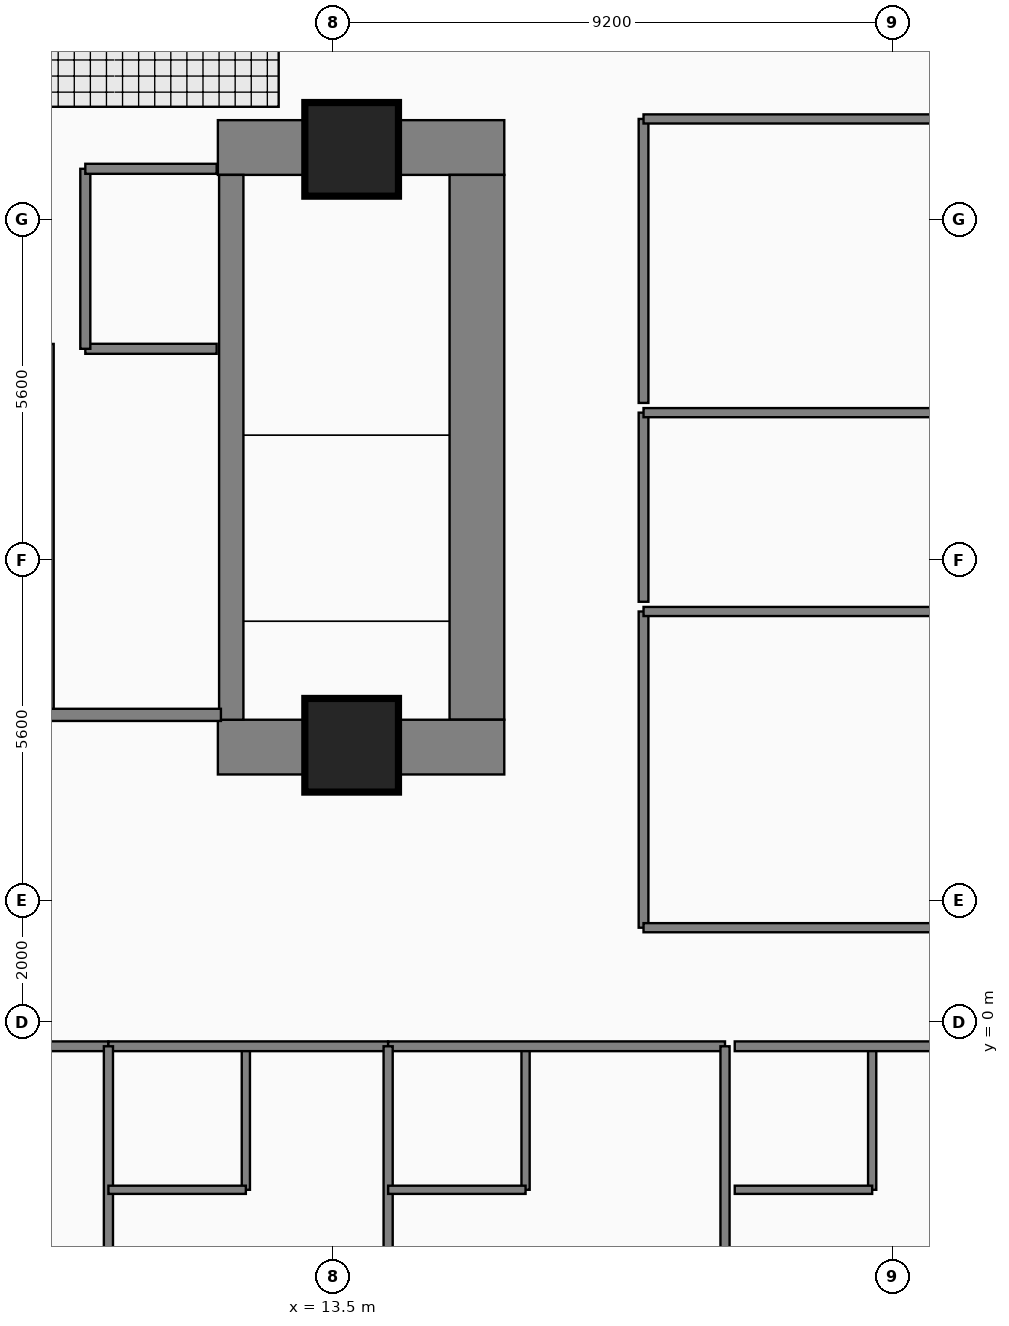
"""IFC4 building model, lengths in metres.
Left out: names, types, materials, properties, quantities, classifications, styles, units other than length and angle.
Written with IfcOpenShell. Run it as: python <this file> out.ifc"""

import sys

from ifc_helpers import new_model, si_unit, direction, frame, frame_2d, origin, origin_2d, place, context, subcontext, project, spatial, rectangle, extrude, element, fill, save


model = new_model("IFC4")
c1 = context("Model", 3, precision=1e-05, world=origin(), true_north=direction((0.0, 1.0)))
c2 = subcontext(c1, "Body", "Model", "MODEL_VIEW")
j1 = project(units=[si_unit("LENGTHUNIT", "METRE"), si_unit("PLANEANGLEUNIT", "RADIAN")], contexts=[c1])
p1 = place(None, origin())
s1 = spatial("IfcSite", under=j1, at=p1, CompositionType="ELEMENT")
p2 = place(p1, origin())
s2 = spatial("IfcBuilding", under=s1, at=p2, CompositionType="ELEMENT")
p3 = place(p2, frame((0.0, 0.0, 27.6)))
s3 = spatial("IfcBuildingStorey", under=s2, at=p3, CompositionType="ELEMENT", Elevation=27.6)
p4 = place(p3, frame((11.6, 14.38, 0.0), z_axis=(0.0, 0.0, 1.0), x_axis=(1.0, 0.0, 0.0)))
e1 = element("IfcWall", 1, at=p4, inside=s3, PredefinedType="SHEAR", context=c2, shape_type="SweptSolid", body=[
    extrude(rectangle(XDim=4.71, YDim=0.9, at=frame_2d((2.355, 0.0))), origin(), (0.0, 0.0, 1.0), 3.46),
])
p5 = place(p3, frame((15.86, 4.97, 0.0), z_axis=(0.0, 0.0, 1.0), x_axis=(0.0, 1.0, 0.0)))
e2 = element("IfcWall", 2, at=p5, inside=s3, PredefinedType="SHEAR", context=c2, shape_type="SweptSolid", body=[
    extrude(rectangle(XDim=8.96, YDim=0.9, at=frame_2d((4.48, 0.0))), origin(), (0.0, 0.0, 1.0), 3.46),
])
p6 = place(p3, frame((11.6, 4.52, 0.0), z_axis=(0.0, 0.0, 1.0), x_axis=(1.0, 0.0, 0.0)))
e3 = element("IfcWall", 3, at=p6, inside=s3, PredefinedType="SHEAR", context=c2, shape_type="SweptSolid", body=[
    extrude(rectangle(XDim=4.71, YDim=0.9, at=frame_2d((2.355, 0.0))), origin(), (0.0, 0.0, 1.0), 3.46),
])
p7 = place(p3, frame((11.82, 13.93, 0.0), z_axis=(0.0, 0.0, 1.0), x_axis=(0.0, -1.0, 0.0)))
e4 = element("IfcWall", 4, at=p7, inside=s3, PredefinedType="SHEAR", context=c2, shape_type="SweptSolid", body=[
    extrude(rectangle(XDim=8.96, YDim=0.4, at=frame_2d((4.48, 0.0))), origin(), (0.0, 0.0, 1.0), 3.46),
])
p8 = place(p7, frame((7.53, 0.0, 0.0)))
e5 = element("IfcOpeningElement", 5, at=p8, cuts=e4, PredefinedType="OPENING", context=c2, shape_type="SweptSolid", body=[
    extrude(rectangle(XDim=1.12, YDim=2.22, at=frame_2d((0.56, 1.11))), frame((0.0, 0.21, 0.0), z_axis=(0.0, -1.0, 0.0), x_axis=(1.0, 0.0, 0.0)), (0.0, 0.0, 1.0), 0.42),
])
for number, where, z_axis, x_axis in (
    (6, (13.8, 14.35, 0.0), (0.0, 0.0, 1.0), (1.0, 0.0, 0.0)),
    (7, (13.8, 4.55, 0.0), (0.0, 0.0, 1.0), (1.0, 0.0, 0.0)),
):
    element("IfcColumn", number, at=place(p3, frame(where, z_axis=z_axis, x_axis=x_axis)), inside=s3, PredefinedType="COLUMN", context=c2, shape_type="SweptSolid", body=[
        extrude(rectangle(XDim=1.5, YDim=1.5, at=origin_2d()), origin(), (0.0, 0.0, 1.0), 3.65),
    ])
p9 = place(p3, frame((8.8, 11.15, 0.0), z_axis=(0.0, 0.0, 1.0), x_axis=(0.0, -1.0, 0.0)))
e8 = element("IfcWall", 8, at=p9, inside=s3, PredefinedType="PARTITIONING", context=c2, shape_type="SweptSolid", body=[
    extrude(rectangle(XDim=6.1, YDim=0.2, at=frame_2d((3.05, 0.0))), origin(), (0.0, 0.0, 1.0), 3.43),
])
p10 = place(p9, frame((1.15, 0.0, 0.0)))
e9 = element("IfcOpeningElement", 9, at=p10, cuts=e8, PredefinedType="OPENING", context=c2, shape_type="SweptSolid", body=[
    extrude(rectangle(XDim=1.1, YDim=2.2, at=frame_2d((0.55, 1.1))), frame((0.0, 0.11, 0.0), z_axis=(0.0, -1.0, 0.0), x_axis=(1.0, 0.0, 0.0)), (0.0, 0.0, 1.0), 0.22),
])
p11 = place(p9, frame((4.75, 0.0, 0.0)))
e10 = element("IfcOpeningElement", 10, at=p11, cuts=e8, PredefinedType="OPENING", context=c2, shape_type="SweptSolid", body=[
    extrude(rectangle(XDim=1.1, YDim=2.2, at=frame_2d((0.55, 1.1))), frame((0.0, 0.11, 0.0), z_axis=(0.0, -1.0, 0.0), x_axis=(1.0, 0.0, 0.0)), (0.0, 0.0, 1.0), 0.22),
])
p12 = place(p3, frame((9.42, 11.07, 0.0), z_axis=(0.0, 0.0, 1.0), x_axis=(1.0, 0.0, 0.0)))
e11 = element("IfcWall", 11, at=p12, inside=s3, PredefinedType="PARTITIONING", context=c2, shape_type="SweptSolid", body=[
    extrude(rectangle(XDim=2.16, YDim=0.165, at=frame_2d((1.08, 0.0))), origin(), (0.0, 0.0, 1.0), 3.43),
])
p13 = place(p12, frame((0.53, 0.0, 0.0)))
e12 = element("IfcOpeningElement", 12, at=p13, cuts=e11, PredefinedType="OPENING", context=c2, shape_type="SweptSolid", body=[
    extrude(rectangle(XDim=1.15, YDim=2.25, at=frame_2d((0.575, 1.125))), frame((0.0, 0.093, 0.0), z_axis=(0.0, -1.0, 0.0), x_axis=(1.0, 0.0, 0.0)), (0.0, 0.0, 1.0), 0.185),
])
p14 = place(p3, frame((4.0, -0.4, 0.0), z_axis=(0.0, 0.0, 1.0), x_axis=(1.0, 0.0, 0.0)))
e13 = element("IfcWall", 13, at=p14, inside=s3, PredefinedType="PARTITIONING", context=c2, shape_type="SweptSolid", body=[
    extrude(rectangle(XDim=5.8, YDim=0.16, at=frame_2d((2.9, 0.0))), origin(), (0.0, 0.0, 1.0), 3.43),
])
p15 = place(p14, frame((3.55, 0.0, 0.0)))
e14 = element("IfcOpeningElement", 14, at=p15, cuts=e13, PredefinedType="OPENING", context=c2, shape_type="SweptSolid", body=[
    extrude(rectangle(XDim=1.0, YDim=2.15, at=frame_2d((0.5, 1.075))), frame((0.0, 0.09, 0.0), z_axis=(0.0, -1.0, 0.0), x_axis=(1.0, 0.0, 0.0)), (0.0, 0.0, 1.0), 0.18),
])
p16 = place(p3, frame((12.06, -2.76, 0.0), z_axis=(0.0, 0.0, 1.0), x_axis=(0.0, 1.0, 0.0)))
e15 = element("IfcWall", 15, at=p16, inside=s3, PredefinedType="PLUMBINGWALL", context=c2, shape_type="SweptSolid", body=[
    extrude(rectangle(XDim=2.36, YDim=0.135, at=frame_2d((1.18, 0.0))), origin(), (0.0, 0.0, 1.0), 3.43),
])
p17 = place(p16, frame((0.65, 0.0, 0.0)))
e16 = element("IfcOpeningElement", 16, at=p17, cuts=e15, PredefinedType="OPENING", context=c2, shape_type="SweptSolid", body=[
    extrude(rectangle(XDim=0.85, YDim=2.1, at=frame_2d((0.425, 1.05))), frame((0.0, 0.077, 0.0), z_axis=(0.0, -1.0, 0.0), x_axis=(1.0, 0.0, 0.0)), (0.0, 0.0, 1.0), 0.155),
])
p18 = place(p3, frame((9.8, -0.4, 0.0), z_axis=(0.0, 0.0, 1.0), x_axis=(1.0, 0.0, 0.0)))
e17 = element("IfcWall", 17, at=p18, inside=s3, PredefinedType="PARTITIONING", context=c2, shape_type="SweptSolid", body=[
    extrude(rectangle(XDim=4.6, YDim=0.16, at=frame_2d((2.3, 0.0))), origin(), (0.0, 0.0, 1.0), 3.43),
])
p19 = place(p18, frame((2.95, 0.0, 0.0)))
e18 = element("IfcOpeningElement", 18, at=p19, cuts=e17, PredefinedType="OPENING", context=c2, shape_type="SweptSolid", body=[
    extrude(rectangle(XDim=1.0, YDim=2.15, at=frame_2d((0.5, 1.075))), frame((0.0, 0.09, 0.0), z_axis=(0.0, -1.0, 0.0), x_axis=(1.0, 0.0, 0.0)), (0.0, 0.0, 1.0), 0.18),
])
p20 = place(p3, frame((16.66, -2.76, 0.0), z_axis=(0.0, 0.0, 1.0), x_axis=(0.0, 1.0, 0.0)))
e19 = element("IfcWall", 19, at=p20, inside=s3, PredefinedType="PLUMBINGWALL", context=c2, shape_type="SweptSolid", body=[
    extrude(rectangle(XDim=2.36, YDim=0.135, at=frame_2d((1.18, 0.0))), origin(), (0.0, 0.0, 1.0), 3.43),
])
p21 = place(p20, frame((0.65, 0.0, 0.0)))
e20 = element("IfcOpeningElement", 20, at=p21, cuts=e19, PredefinedType="OPENING", context=c2, shape_type="SweptSolid", body=[
    extrude(rectangle(XDim=0.85, YDim=2.1, at=frame_2d((0.425, 1.05))), frame((0.0, 0.077, 0.0), z_axis=(0.0, -1.0, 0.0), x_axis=(1.0, 0.0, 0.0)), (0.0, 0.0, 1.0), 0.155),
])
p22 = place(p3, frame((14.4, -0.4, 0.0), z_axis=(0.0, 0.0, 1.0), x_axis=(1.0, 0.0, 0.0)))
e21 = element("IfcWall", 21, at=p22, inside=s3, PredefinedType="PARTITIONING", context=c2, shape_type="SweptSolid", body=[
    extrude(rectangle(XDim=5.54, YDim=0.16, at=frame_2d((2.77, 0.0))), origin(), (0.0, 0.0, 1.0), 3.43),
])
p23 = place(p22, frame((3.42, 0.0, 0.0)))
e22 = element("IfcOpeningElement", 22, at=p23, cuts=e21, PredefinedType="OPENING", context=c2, shape_type="SweptSolid", body=[
    extrude(rectangle(XDim=1.0, YDim=2.15, at=frame_2d((0.5, 1.075))), frame((0.0, 0.09, 0.0), z_axis=(0.0, -1.0, 0.0), x_axis=(1.0, 0.0, 0.0)), (0.0, 0.0, 1.0), 0.18),
])
p24 = place(p3, frame((22.36, -2.76, 0.0), z_axis=(0.0, 0.0, 1.0), x_axis=(0.0, 1.0, 0.0)))
e23 = element("IfcWall", 23, at=p24, inside=s3, PredefinedType="PLUMBINGWALL", context=c2, shape_type="SweptSolid", body=[
    extrude(rectangle(XDim=2.36, YDim=0.135, at=frame_2d((1.18, 0.0))), origin(), (0.0, 0.0, 1.0), 3.43),
])
p25 = place(p24, frame((0.65, 0.0, 0.0)))
e24 = element("IfcOpeningElement", 24, at=p25, cuts=e23, PredefinedType="OPENING", context=c2, shape_type="SweptSolid", body=[
    extrude(rectangle(XDim=0.85, YDim=2.1, at=frame_2d((0.425, 1.05))), frame((0.0, 0.077, 0.0), z_axis=(0.0, -1.0, 0.0), x_axis=(1.0, 0.0, 0.0)), (0.0, 0.0, 1.0), 0.155),
])
p26 = place(p3, frame((20.1, -0.4, 0.0), z_axis=(0.0, 0.0, 1.0), x_axis=(1.0, 0.0, 0.0)))
e25 = element("IfcWall", 25, at=p26, inside=s3, PredefinedType="PARTITIONING", context=c2, shape_type="SweptSolid", body=[
    extrude(rectangle(XDim=5.54, YDim=0.16, at=frame_2d((2.77, 0.0))), origin(), (0.0, 0.0, 1.0), 3.43),
])
p27 = place(p26, frame((3.42, 0.0, 0.0)))
e26 = element("IfcOpeningElement", 26, at=p27, cuts=e25, PredefinedType="OPENING", context=c2, shape_type="SweptSolid", body=[
    extrude(rectangle(XDim=1.0, YDim=2.15, at=frame_2d((0.5, 1.075))), frame((0.0, 0.09, 0.0), z_axis=(0.0, -1.0, 0.0), x_axis=(1.0, 0.0, 0.0)), (0.0, 0.0, 1.0), 0.18),
])
p28 = place(p3, frame((18.6, 1.55, 0.0), z_axis=(0.0, 0.0, 1.0), x_axis=(0.0, 1.0, 0.0)))
e27 = element("IfcWall", 27, at=p28, inside=s3, PredefinedType="PARTITIONING", context=c2, shape_type="SweptSolid", body=[
    extrude(rectangle(XDim=5.2, YDim=0.16, at=frame_2d((2.6, 0.0))), origin(), (0.0, 0.0, 1.0), 3.43),
])
p29 = place(p28, frame((2.14, 0.0, 0.0)))
e28 = element("IfcOpeningElement", 28, at=p29, cuts=e27, PredefinedType="OPENING", context=c2, shape_type="SweptSolid", body=[
    extrude(rectangle(XDim=0.92, YDim=2.12, at=frame_2d((0.46, 1.06))), frame((0.0, 0.09, 0.0), z_axis=(0.0, -1.0, 0.0), x_axis=(1.0, 0.0, 0.0)), (0.0, 0.0, 1.0), 0.18),
])
p30 = place(p3, frame((18.6, 6.91, 0.0), z_axis=(0.0, 0.0, 1.0), x_axis=(0.0, 1.0, 0.0)))
e29 = element("IfcWall", 29, at=p30, inside=s3, PredefinedType="PARTITIONING", context=c2, shape_type="SweptSolid", body=[
    extrude(rectangle(XDim=3.11, YDim=0.16, at=frame_2d((1.555, 0.0))), origin(), (0.0, 0.0, 1.0), 3.43),
])
p31 = place(p30, frame((1.095, 0.0, 0.0)))
e30 = element("IfcOpeningElement", 30, at=p31, cuts=e29, PredefinedType="OPENING", context=c2, shape_type="SweptSolid", body=[
    extrude(rectangle(XDim=0.92, YDim=2.12, at=frame_2d((0.46, 1.06))), frame((0.0, 0.09, 0.0), z_axis=(0.0, -1.0, 0.0), x_axis=(1.0, 0.0, 0.0)), (0.0, 0.0, 1.0), 0.18),
])
p32 = place(p3, frame((18.6, 10.18, 0.0), z_axis=(0.0, 0.0, 1.0), x_axis=(0.0, 1.0, 0.0)))
e31 = element("IfcWall", 31, at=p32, inside=s3, PredefinedType="PARTITIONING", context=c2, shape_type="SweptSolid", body=[
    extrude(rectangle(XDim=4.67, YDim=0.16, at=frame_2d((2.335, 0.0))), origin(), (0.0, 0.0, 1.0), 3.43),
])
p33 = place(p32, frame((1.875, 0.0, 0.0)))
e32 = element("IfcOpeningElement", 32, at=p33, cuts=e31, PredefinedType="OPENING", context=c2, shape_type="SweptSolid", body=[
    extrude(rectangle(XDim=0.92, YDim=2.12, at=frame_2d((0.46, 1.06))), frame((0.0, 0.09, 0.0), z_axis=(0.0, -1.0, 0.0), x_axis=(1.0, 0.0, 0.0)), (0.0, 0.0, 1.0), 0.18),
])
p34 = place(p3, frame((8.8, 5.05, 0.0), z_axis=(0.0, 0.0, 1.0), x_axis=(1.0, 0.0, 0.0)))
e33 = element("IfcWall", 33, at=p34, inside=s3, PredefinedType="PARTITIONING", context=c2, shape_type="SweptSolid", body=[
    extrude(rectangle(XDim=2.85, YDim=0.2, at=frame_2d((1.425, 0.0))), origin(), (0.0, 0.0, 1.0), 3.43),
])
p35 = place(p3, frame((9.42, 11.07, 0.0), z_axis=(0.0, 0.0, 1.0), x_axis=(0.0, 1.0, 0.0)))
e34 = element("IfcWall", 34, at=p35, inside=s3, PredefinedType="PARTITIONING", context=c2, shape_type="SweptSolid", body=[
    extrude(rectangle(XDim=2.96, YDim=0.165, at=frame_2d((1.48, 0.0))), origin(), (0.0, 0.0, 1.0), 3.43),
])
p36 = place(p3, frame((9.42, 14.03, 0.0), z_axis=(0.0, 0.0, 1.0), x_axis=(1.0, 0.0, 0.0)))
e35 = element("IfcWall", 35, at=p36, inside=s3, PredefinedType="PARTITIONING", context=c2, shape_type="SweptSolid", body=[
    extrude(rectangle(XDim=2.16, YDim=0.165, at=frame_2d((1.08, 0.0))), origin(), (0.0, 0.0, 1.0), 3.43),
])
p37 = place(p3, frame((9.8, -23.02, 0.0), z_axis=(0.0, 0.0, 1.0), x_axis=(0.0, 1.0, 0.0)))
e36 = element("IfcWall", 36, at=p37, inside=s3, PredefinedType="PARTITIONING", context=c2, shape_type="SweptSolid", body=[
    extrude(rectangle(XDim=22.62, YDim=0.15, at=frame_2d((11.31, 0.0))), origin(), (0.0, 0.0, 1.0), 3.43),
])
p38 = place(p3, frame((9.8, -2.76, 0.0), z_axis=(0.0, 0.0, 1.0), x_axis=(1.0, 0.0, 0.0)))
e37 = element("IfcWall", 37, at=p38, inside=s3, PredefinedType="PLUMBINGWALL", context=c2, shape_type="SweptSolid", body=[
    extrude(rectangle(XDim=2.26, YDim=0.135, at=frame_2d((1.13, 0.0))), origin(), (0.0, 0.0, 1.0), 3.43),
])
p39 = place(p3, frame((14.4, -23.02, 0.0), z_axis=(0.0, 0.0, 1.0), x_axis=(0.0, 1.0, 0.0)))
e38 = element("IfcWall", 38, at=p39, inside=s3, PredefinedType="PARTITIONING", context=c2, shape_type="SweptSolid", body=[
    extrude(rectangle(XDim=22.62, YDim=0.15, at=frame_2d((11.31, 0.0))), origin(), (0.0, 0.0, 1.0), 3.43),
])
p40 = place(p3, frame((14.4, -2.76, 0.0), z_axis=(0.0, 0.0, 1.0), x_axis=(1.0, 0.0, 0.0)))
e39 = element("IfcWall", 39, at=p40, inside=s3, PredefinedType="PLUMBINGWALL", context=c2, shape_type="SweptSolid", body=[
    extrude(rectangle(XDim=2.26, YDim=0.135, at=frame_2d((1.13, 0.0))), origin(), (0.0, 0.0, 1.0), 3.43),
])
p41 = place(p3, frame((19.94, -23.02, 0.0), z_axis=(0.0, 0.0, 1.0), x_axis=(0.0, 1.0, 0.0)))
e40 = element("IfcWall", 40, at=p41, inside=s3, PredefinedType="PARTITIONING", context=c2, shape_type="SweptSolid", body=[
    extrude(rectangle(XDim=22.62, YDim=0.15, at=frame_2d((11.31, 0.0))), origin(), (0.0, 0.0, 1.0), 3.43),
])
p42 = place(p3, frame((20.1, -2.76, 0.0), z_axis=(0.0, 0.0, 1.0), x_axis=(1.0, 0.0, 0.0)))
e41 = element("IfcWall", 41, at=p42, inside=s3, PredefinedType="PLUMBINGWALL", context=c2, shape_type="SweptSolid", body=[
    extrude(rectangle(XDim=2.26, YDim=0.135, at=frame_2d((1.13, 0.0))), origin(), (0.0, 0.0, 1.0), 3.43),
])
p43 = place(p3, frame((18.6, 1.55, 0.0), z_axis=(0.0, 0.0, 1.0), x_axis=(1.0, 0.0, 0.0)))
e42 = element("IfcWall", 42, at=p43, inside=s3, PredefinedType="PARTITIONING", context=c2, shape_type="SweptSolid", body=[
    extrude(rectangle(XDim=9.005, YDim=0.15, at=frame_2d((4.503, 0.0))), origin(), (0.0, 0.0, 1.0), 3.43),
])
for number, where, z_axis, x_axis in (
    (43, (18.6, 6.75, 0.0), (0.0, 0.0, 1.0), (1.0, 0.0, 0.0)),
    (44, (18.6, 10.02, 0.0), (0.0, 0.0, 1.0), (1.0, 0.0, 0.0)),
    (45, (18.6, 14.85, 0.0), (0.0, 0.0, 1.0), (1.0, 0.0, 0.0)),
):
    element("IfcWall", number, at=place(p3, frame(where, z_axis=z_axis, x_axis=x_axis)), inside=s3, PredefinedType="PARTITIONING", context=c2, shape_type="SweptSolid", body=[
        extrude(rectangle(XDim=7.04, YDim=0.15, at=frame_2d((3.52, 0.0))), origin(), (0.0, 0.0, 1.0), 3.43),
    ])
p44 = place(p8, origin())
e46 = element("IfcDoor", 46, at=p44, inside=s3, OperationType="SINGLE_SWING_RIGHT", PredefinedType="DOOR", context=c2, shape_type="SweptSolid", body=[
    extrude(rectangle(XDim=1.12, YDim=2.22, at=frame_2d((0.56, 1.11))), frame((0.0, 0.025, 0.0), z_axis=(0.0, -1.0, 0.0), x_axis=(1.0, 0.0, 0.0)), (0.0, 0.0, 1.0), 0.05),
])
fill(e5, e46)
p45 = place(p13, origin())
e47 = element("IfcDoor", 47, at=p45, inside=s3, OperationType="SLIDING_TO_LEFT", PredefinedType="DOOR", context=c2, shape_type="SweptSolid", body=[
    extrude(rectangle(XDim=1.15, YDim=2.25, at=frame_2d((0.575, 1.125))), frame((0.0, 0.025, 0.0), z_axis=(0.0, -1.0, 0.0), x_axis=(1.0, 0.0, 0.0)), (0.0, 0.0, 1.0), 0.05),
])
fill(e12, e47)
p46 = place(p17, origin())
e48 = element("IfcDoor", 48, at=p46, inside=s3, OperationType="SINGLE_SWING_LEFT", PredefinedType="DOOR", context=c2, shape_type="SweptSolid", body=[
    extrude(rectangle(XDim=0.85, YDim=2.1, at=frame_2d((0.425, 1.05))), frame((0.0, 0.025, 0.0), z_axis=(0.0, -1.0, 0.0), x_axis=(1.0, 0.0, 0.0)), (0.0, 0.0, 1.0), 0.05),
])
fill(e16, e48)
p47 = place(p19, origin())
e49 = element("IfcDoor", 49, at=p47, inside=s3, OperationType="SINGLE_SWING_RIGHT", PredefinedType="DOOR", context=c2, shape_type="SweptSolid", body=[
    extrude(rectangle(XDim=1.0, YDim=2.15, at=frame_2d((0.5, 1.075))), frame((0.0, 0.025, 0.0), z_axis=(0.0, -1.0, 0.0), x_axis=(1.0, 0.0, 0.0)), (0.0, 0.0, 1.0), 0.05),
])
fill(e18, e49)
p48 = place(p21, origin())
e50 = element("IfcDoor", 50, at=p48, inside=s3, OperationType="SINGLE_SWING_LEFT", PredefinedType="DOOR", context=c2, shape_type="SweptSolid", body=[
    extrude(rectangle(XDim=0.85, YDim=2.1, at=frame_2d((0.425, 1.05))), frame((0.0, 0.025, 0.0), z_axis=(0.0, -1.0, 0.0), x_axis=(1.0, 0.0, 0.0)), (0.0, 0.0, 1.0), 0.05),
])
fill(e20, e50)
p49 = place(p23, origin())
e51 = element("IfcDoor", 51, at=p49, inside=s3, OperationType="SINGLE_SWING_RIGHT", PredefinedType="DOOR", context=c2, shape_type="SweptSolid", body=[
    extrude(rectangle(XDim=1.0, YDim=2.15, at=frame_2d((0.5, 1.075))), frame((0.0, 0.025, 0.0), z_axis=(0.0, -1.0, 0.0), x_axis=(1.0, 0.0, 0.0)), (0.0, 0.0, 1.0), 0.05),
])
fill(e22, e51)
p50 = place(p25, origin())
e52 = element("IfcDoor", 52, at=p50, inside=s3, OperationType="SINGLE_SWING_LEFT", PredefinedType="DOOR", context=c2, shape_type="SweptSolid", body=[
    extrude(rectangle(XDim=0.85, YDim=2.1, at=frame_2d((0.425, 1.05))), frame((0.0, 0.025, 0.0), z_axis=(0.0, -1.0, 0.0), x_axis=(1.0, 0.0, 0.0)), (0.0, 0.0, 1.0), 0.05),
])
fill(e24, e52)
p51 = place(p29, origin())
e53 = element("IfcDoor", 53, at=p51, inside=s3, OperationType="SINGLE_SWING_LEFT", PredefinedType="DOOR", context=c2, shape_type="SweptSolid", body=[
    extrude(rectangle(XDim=0.92, YDim=2.12, at=frame_2d((0.46, 1.06))), frame((0.0, 0.025, 0.0), z_axis=(0.0, -1.0, 0.0), x_axis=(1.0, 0.0, 0.0)), (0.0, 0.0, 1.0), 0.05),
])
fill(e28, e53)
p52 = place(p31, origin())
e54 = element("IfcDoor", 54, at=p52, inside=s3, OperationType="SINGLE_SWING_RIGHT", PredefinedType="DOOR", context=c2, shape_type="SweptSolid", body=[
    extrude(rectangle(XDim=0.92, YDim=2.12, at=frame_2d((0.46, 1.06))), frame((0.0, 0.025, 0.0), z_axis=(0.0, -1.0, 0.0), x_axis=(1.0, 0.0, 0.0)), (0.0, 0.0, 1.0), 0.05),
])
fill(e30, e54)
p53 = place(p33, origin())
e55 = element("IfcDoor", 55, at=p53, inside=s3, OperationType="SINGLE_SWING_LEFT", PredefinedType="DOOR", context=c2, shape_type="SweptSolid", body=[
    extrude(rectangle(XDim=0.92, YDim=2.12, at=frame_2d((0.46, 1.06))), frame((0.0, 0.025, 0.0), z_axis=(0.0, -1.0, 0.0), x_axis=(1.0, 0.0, 0.0)), (0.0, 0.0, 1.0), 0.05),
])
fill(e32, e55)
save(model, sys.argv[1])
